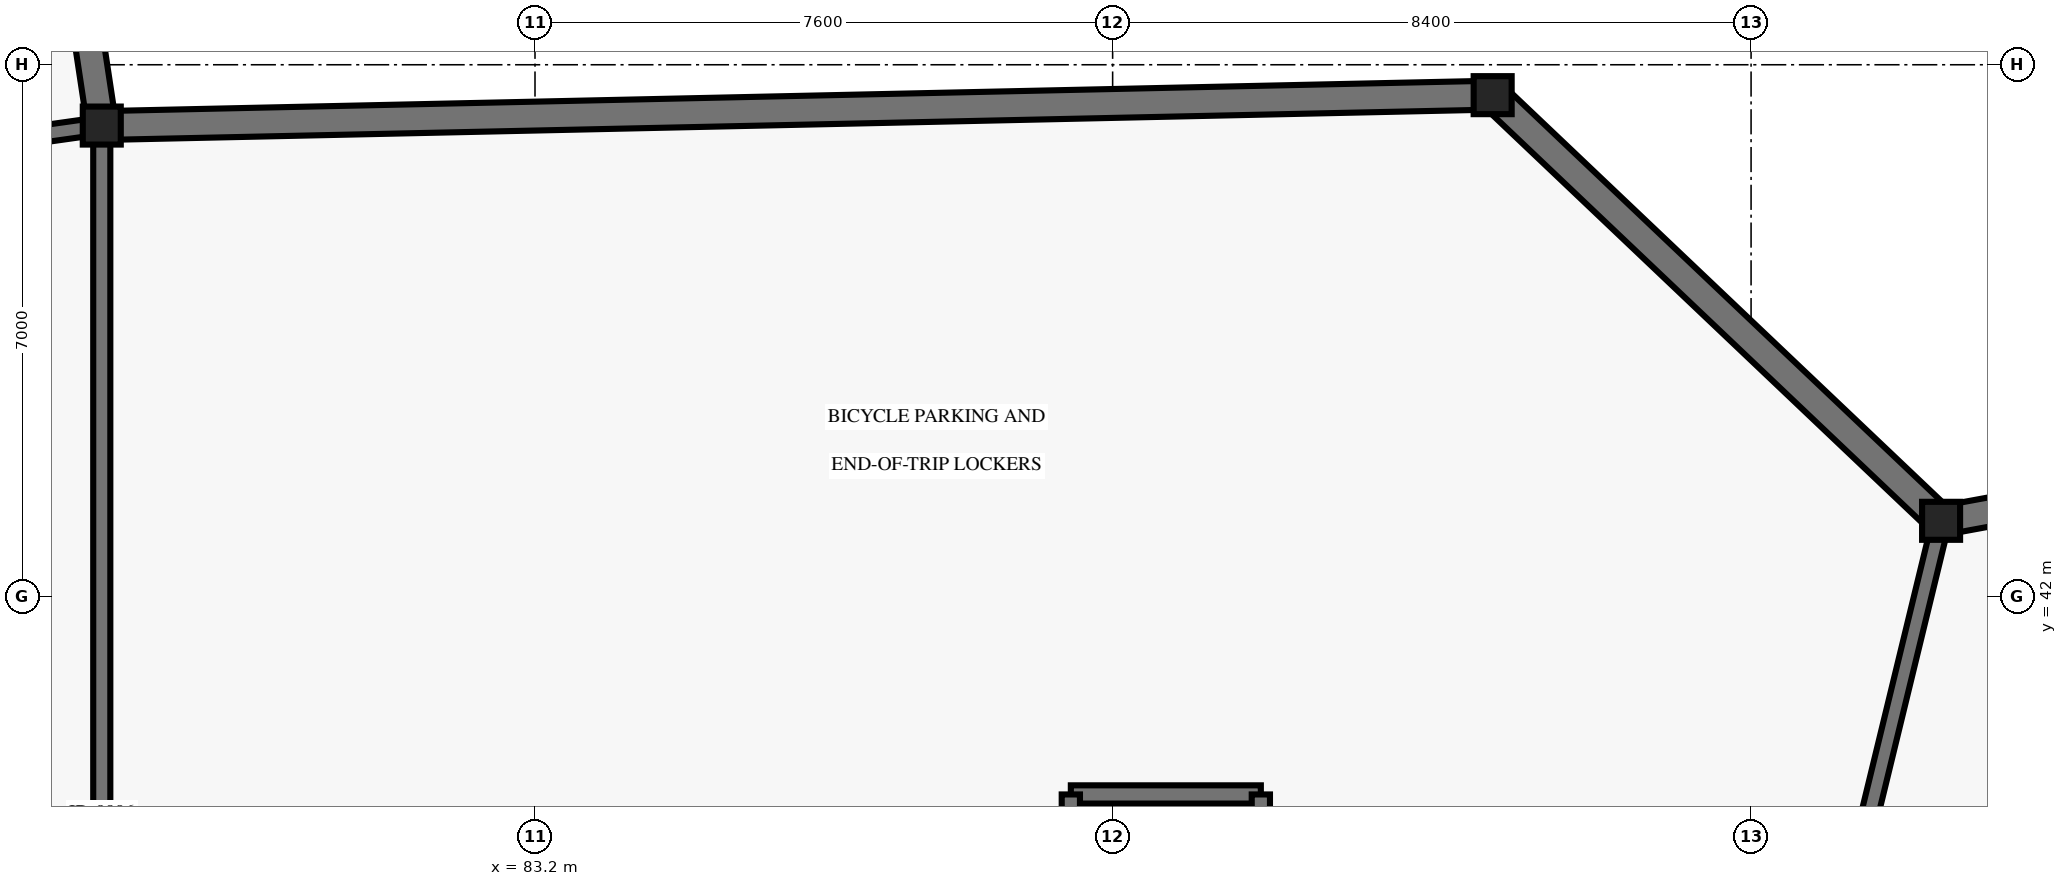
"""IFC4 building model, lengths in metres.
Left out: names, types, materials, properties, quantities, classifications, styles, units other than length and angle.
Written with IfcOpenShell. Run it as: python <this file> out.ifc"""

import sys

from ifc_helpers import new_model, si_unit, direction, frame, frame_2d, origin, origin_2d, place, context, subcontext, project, spatial, rectangle, i_section, extrude, element, save


model = new_model("IFC4")
c1 = context("Model", 3, precision=1e-05, world=origin(), true_north=direction((0.0, 1.0)))
c2 = subcontext(c1, "Body", "Model", "MODEL_VIEW")
j1 = project(units=[si_unit("LENGTHUNIT", "METRE"), si_unit("PLANEANGLEUNIT", "RADIAN")], contexts=[c1])
p1 = place(None, origin())
s1 = spatial("IfcSite", under=j1, at=p1, CompositionType="ELEMENT")
p2 = place(p1, origin())
s2 = spatial("IfcBuilding", under=s1, at=p2, CompositionType="ELEMENT")
p3 = place(p2, frame((0.0, 0.0, -4.5)))
s3 = spatial("IfcBuildingStorey", under=s2, at=p3, CompositionType="ELEMENT", Elevation=-4.5)
for number, where, z_axis, x_axis in (
    (1, (77.5, 48.2, 0.0), (0.0, 0.0, 1.0), (1.0, 0.0, 0.0)),
    (2, (95.8, 48.6, 0.0), (0.0, 0.0, 1.0), (1.0, 0.0, 0.0)),
    (3, (101.7, 43.0, 0.0), (0.0, 0.0, 1.0), (1.0, 0.0, 0.0)),
):
    element("IfcColumn", number, at=place(p3, frame(where, z_axis=z_axis, x_axis=x_axis)), inside=s3, PredefinedType="COLUMN", context=c2, shape_type="SweptSolid", body=[
        extrude(i_section(OverallWidth=0.5, OverallDepth=0.5, WebThickness=0.022, FlangeThickness=0.036, at=origin_2d()), origin(), (0.0, 0.0, 1.0), 4.5),
    ])
p4 = place(p3, frame((101.664, 43.034, 0.0), z_axis=(0.0, 0.0, 1.0), x_axis=(-0.725286613019, 0.688447041518, 0.0)))
e4 = element("IfcWall", 4, at=p4, inside=s3, PredefinedType="USERDEFINED", context=c2, shape_type="SweptSolid", body=[
    extrude(rectangle(XDim=8.085, YDim=0.38, at=frame_2d((4.042, 0.0))), origin(), (0.0, 0.0, 1.0), 4.14),
])
p5 = place(p3, frame((95.8, 48.6, 0.0), z_axis=(0.0, 0.0, 1.0), x_axis=(-0.999760886501, -0.021867094518, 0.0)))
e5 = element("IfcWall", 5, at=p5, inside=s3, PredefinedType="USERDEFINED", context=c2, shape_type="SweptSolid", body=[
    extrude(rectangle(XDim=18.254, YDim=0.38, at=frame_2d((9.127, 0.0))), origin(), (0.0, 0.0, 1.0), 4.14),
])
p6 = place(p3, frame((77.493, 48.249, 0.0), z_axis=(0.0, 0.0, 1.0), x_axis=(-0.149164377012, 0.988812413267, 0.0)))
e6 = element("IfcWall", 6, at=p6, inside=s3, PredefinedType="USERDEFINED", context=c2, shape_type="SweptSolid", body=[
    extrude(rectangle(XDim=18.053, YDim=0.38, at=frame_2d((9.026, 0.0))), origin(), (0.0, 0.0, 1.0), 4.14),
])
p7 = place(p3, frame((125.547, 47.39, 0.0), z_axis=(0.0, 0.0, 1.0), x_axis=(-0.98347527233, -0.181042505275, 0.0)))
e7 = element("IfcWall", 7, at=p7, inside=s3, PredefinedType="USERDEFINED", context=c2, shape_type="SweptSolid", body=[
    extrude(rectangle(XDim=24.198, YDim=0.38, at=frame_2d((12.099, 0.0))), origin(), (0.0, 0.0, 1.0), 4.14),
])
p8 = place(p3, frame((77.5, 27.4, 0.0), z_axis=(0.0, 0.0, 1.0), x_axis=(0.0, 1.0, 0.0)))
e8 = element("IfcWall", 8, at=p8, inside=s3, PredefinedType="SOLIDWALL", context=c2, shape_type="SweptSolid", body=[
    extrude(rectangle(XDim=20.8, YDim=0.225, at=frame_2d((10.4, 0.0))), origin(), (0.0, 0.0, 1.0), 4.14),
])
p9 = place(p8, frame((9.8, 0.0, 0.0)))
e9 = element("IfcOpeningElement", 9, at=p9, cuts=e8, PredefinedType="OPENING", context=c2, shape_type="SweptSolid", body=[
    extrude(rectangle(XDim=1.2, YDim=2.2, at=frame_2d((0.6, 1.1))), frame((0.0, 0.123, 0.0), z_axis=(0.0, -1.0, 0.0), x_axis=(1.0, 0.0, 0.0)), (0.0, 0.0, 1.0), 0.245),
])
p10 = place(p3, frame((77.5, 48.2, 0.0), z_axis=(0.0, 0.0, 1.0), x_axis=(-0.990181159322, -0.139790098807, 0.0)))
e10 = element("IfcWall", 10, at=p10, inside=s3, PredefinedType="SOLIDWALL", context=c2, shape_type="SweptSolid", body=[
    extrude(rectangle(XDim=15.738, YDim=0.225, at=frame_2d((7.869, 0.0))), origin(), (0.0, 0.0, 1.0), 4.14),
])
p11 = place(p10, frame((7.294, 0.0, 0.0)))
e11 = element("IfcOpeningElement", 11, at=p11, cuts=e10, PredefinedType="OPENING", context=c2, shape_type="SweptSolid", body=[
    extrude(rectangle(XDim=1.15, YDim=2.2, at=frame_2d((0.575, 1.1))), frame((0.0, 0.123, 0.0), z_axis=(0.0, -1.0, 0.0), x_axis=(1.0, 0.0, 0.0)), (0.0, 0.0, 1.0), 0.245),
])
p12 = place(p3, frame((98.1, 28.2, 0.0), z_axis=(0.0, 0.0, 1.0), x_axis=(0.236341762997, 0.971669990822, 0.0)))
e12 = element("IfcWall", 12, at=p12, inside=s3, PredefinedType="SOLIDWALL", context=c2, shape_type="SweptSolid", body=[
    extrude(rectangle(XDim=15.231, YDim=0.225, at=frame_2d((7.616, 0.0))), origin(), (0.0, 0.0, 1.0), 4.14),
])
p13 = place(p12, frame((7.016, 0.0, 0.0)))
e13 = element("IfcOpeningElement", 13, at=p13, cuts=e12, PredefinedType="OPENING", context=c2, shape_type="SweptSolid", body=[
    extrude(rectangle(XDim=1.2, YDim=2.2, at=frame_2d((0.6, 1.1))), frame((0.0, 0.123, 0.0), z_axis=(0.0, -1.0, 0.0), x_axis=(1.0, 0.0, 0.0)), (0.0, 0.0, 1.0), 0.245),
])
p14 = place(p3, frame((90.25, 39.4, 0.0), z_axis=(0.0, 0.0, 1.0), x_axis=(1.0, 0.0, 0.0)))
e14 = element("IfcWall", 14, at=p14, inside=s3, PredefinedType="SHEAR", context=c2, shape_type="SweptSolid", body=[
    extrude(rectangle(XDim=2.5, YDim=0.24, at=frame_2d((1.25, 0.0))), origin(), (0.0, 0.0, 1.0), 4.26),
])
for number, where, z_axis, x_axis in (
    (15, (92.75, 39.4, 0.0), (0.0, 0.0, 1.0), (0.0, -1.0, 0.0)),
    (16, (90.25, 36.6, 0.0), (0.0, 0.0, 1.0), (0.0, 1.0, 0.0)),
):
    element("IfcWall", number, at=place(p3, frame(where, z_axis=z_axis, x_axis=x_axis)), inside=s3, PredefinedType="SHEAR", context=c2, shape_type="SweptSolid", body=[
        extrude(rectangle(XDim=2.8, YDim=0.24, at=frame_2d((1.4, 0.0))), origin(), (0.0, 0.0, 1.0), 4.26),
    ])
save(model, sys.argv[1])
